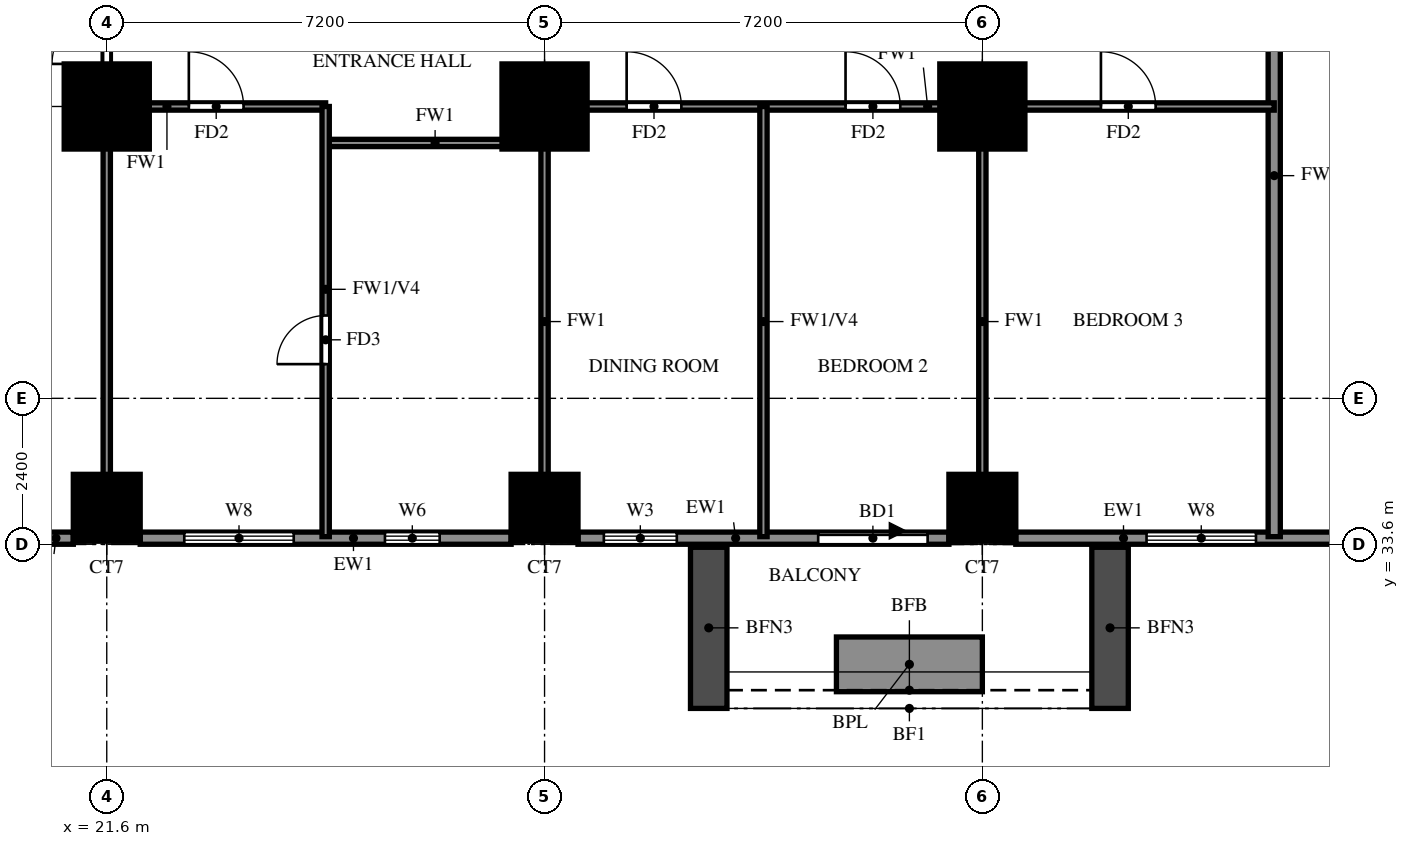
"""IFC4 building model, lengths in metres.
Left out: names, types, materials, properties, quantities, classifications, styles, units other than length and angle.
Written with IfcOpenShell. Run it as: python <this file> out.ifc"""

import sys

from ifc_helpers import new_model, si_unit, direction, frame, frame_2d, origin, origin_2d, place, context, subcontext, project, spatial, rectangle, extrude, source, transform, mapped, element, fill, save


model = new_model("IFC4")
c1 = context("Model", 3, precision=1e-05, world=origin(), true_north=direction((0.0, 1.0)))
c2 = subcontext(c1, "Body", "Model", "MODEL_VIEW")
j1 = project(units=[si_unit("LENGTHUNIT", "METRE"), si_unit("PLANEANGLEUNIT", "RADIAN")], contexts=[c1])
p1 = place(None, origin())
s1 = spatial("IfcSite", under=j1, at=p1, CompositionType="ELEMENT")
p2 = place(p1, origin())
s2 = spatial("IfcBuilding", under=s1, at=p2, CompositionType="ELEMENT")
p3 = place(p2, frame((0.0, 0.0, 58.5)))
s3 = spatial("IfcBuildingStorey", under=s2, at=p3, CompositionType="ELEMENT", Elevation=58.5)
m1 = source(origin(), c2, "Body", "SweptSolid", [
    extrude(rectangle(XDim=1.1, YDim=1.1, at=origin_2d()), origin(), (0.0, 0.0, 1.0), 3.18),
])
for number, where, z_axis, x_axis in (
    (1, (21.6, 34.2, 0.0), (0.0, 0.0, 1.0), (1.0, 0.0, 0.0)),
    (2, (28.8, 34.2, 0.0), (0.0, 0.0, 1.0), (1.0, 0.0, 0.0)),
    (3, (36.0, 34.2, 0.0), (0.0, 0.0, 1.0), (1.0, 0.0, 0.0)),
):
    element("IfcColumn", number, at=place(p3, frame(where, z_axis=z_axis, x_axis=x_axis)), inside=s3, PredefinedType="COLUMN", context=c2, shape_type="MappedRepresentation", body=[
        mapped(m1, transform((0.0, 0.0, 0.0))),
    ])
m2 = source(origin(), c2, "Body", "SweptSolid", [
    extrude(rectangle(XDim=1.4, YDim=1.4, at=origin_2d()), origin(), (0.0, 0.0, 1.0), 3.18),
])
for number, where, z_axis, x_axis in (
    (4, (21.6, 40.8, 0.0), (0.0, 0.0, 1.0), (1.0, 0.0, 0.0)),
    (5, (28.8, 40.8, 0.0), (0.0, 0.0, 1.0), (1.0, 0.0, 0.0)),
    (6, (36.0, 40.8, 0.0), (0.0, 0.0, 1.0), (1.0, 0.0, 0.0)),
):
    element("IfcColumn", number, at=place(p3, frame(where, z_axis=z_axis, x_axis=x_axis)), inside=s3, PredefinedType="COLUMN", context=c2, shape_type="MappedRepresentation", body=[
        mapped(m2, transform((0.0, 0.0, 0.0))),
    ])
p4 = place(p3, frame((18.2, 33.7, 0.0), z_axis=(0.0, 0.0, 1.0), x_axis=(1.0, 0.0, 0.0)))
e7 = element("IfcWall", 7, at=p4, inside=s3, PredefinedType="SOLIDWALL", context=c2, shape_type="SweptSolid", body=[
    extrude(rectangle(XDim=2.85, YDim=0.2, at=frame_2d((1.425, 0.0))), origin(), (0.0, 0.0, 1.0), 3.18),
])
p5 = place(p4, frame((0.525, 0.0, 0.6)))
e8 = element("IfcOpeningElement", 8, at=p5, cuts=e7, PredefinedType="OPENING", context=c2, shape_type="SweptSolid", body=[
    extrude(rectangle(XDim=1.8, YDim=2.4, at=frame_2d((0.9, 1.2))), frame((0.0, 0.11, 0.0), z_axis=(0.0, -1.0, 0.0), x_axis=(1.0, 0.0, 0.0)), (0.0, 0.0, 1.0), 0.22),
])
p6 = place(p3, frame((22.15, 33.7, 0.0), z_axis=(0.0, 0.0, 1.0), x_axis=(1.0, 0.0, 0.0)))
e9 = element("IfcWall", 9, at=p6, inside=s3, PredefinedType="SOLIDWALL", context=c2, shape_type="SweptSolid", body=[
    extrude(rectangle(XDim=6.1, YDim=0.2, at=frame_2d((3.05, 0.0))), origin(), (0.0, 0.0, 1.0), 3.18),
])
p7 = place(p6, frame((0.725, 0.0, 0.6)))
e10 = element("IfcOpeningElement", 10, at=p7, cuts=e9, PredefinedType="OPENING", context=c2, shape_type="SweptSolid", body=[
    extrude(rectangle(XDim=1.8, YDim=2.4, at=frame_2d((0.9, 1.2))), frame((0.0, 0.11, 0.0), z_axis=(0.0, -1.0, 0.0), x_axis=(1.0, 0.0, 0.0)), (0.0, 0.0, 1.0), 0.22),
])
p8 = place(p6, frame((4.025, 0.0, 1.5)))
e11 = element("IfcOpeningElement", 11, at=p8, cuts=e9, PredefinedType="OPENING", context=c2, shape_type="SweptSolid", body=[
    extrude(rectangle(XDim=0.9, YDim=0.9, at=frame_2d((0.45, 0.45))), frame((0.0, 0.11, 0.0), z_axis=(0.0, -1.0, 0.0), x_axis=(1.0, 0.0, 0.0)), (0.0, 0.0, 1.0), 0.22),
])
p9 = place(p3, frame((29.35, 33.7, 0.0), z_axis=(0.0, 0.0, 1.0), x_axis=(1.0, 0.0, 0.0)))
e12 = element("IfcWall", 12, at=p9, inside=s3, PredefinedType="SOLIDWALL", context=c2, shape_type="SweptSolid", body=[
    extrude(rectangle(XDim=6.1, YDim=0.2, at=frame_2d((3.05, 0.0))), origin(), (0.0, 0.0, 1.0), 3.18),
])
p10 = place(p9, frame((3.95, 0.0, 0.0)))
e13 = element("IfcOpeningElement", 13, at=p10, cuts=e12, PredefinedType="OPENING", context=c2, shape_type="SweptSolid", body=[
    extrude(rectangle(XDim=1.8, YDim=2.4, at=frame_2d((0.9, 1.2))), frame((0.0, 0.11, 0.0), z_axis=(0.0, -1.0, 0.0), x_axis=(1.0, 0.0, 0.0)), (0.0, 0.0, 1.0), 0.22),
])
p11 = place(p9, frame((0.425, 0.0, 0.6)))
e14 = element("IfcOpeningElement", 14, at=p11, cuts=e12, PredefinedType="OPENING", context=c2, shape_type="SweptSolid", body=[
    extrude(rectangle(XDim=1.2, YDim=2.4, at=frame_2d((0.6, 1.2))), frame((0.0, 0.11, 0.0), z_axis=(0.0, -1.0, 0.0), x_axis=(1.0, 0.0, 0.0)), (0.0, 0.0, 1.0), 0.22),
])
p12 = place(p3, frame((36.55, 33.7, 0.0), z_axis=(0.0, 0.0, 1.0), x_axis=(1.0, 0.0, 0.0)))
e15 = element("IfcWall", 15, at=p12, inside=s3, PredefinedType="SOLIDWALL", context=c2, shape_type="SweptSolid", body=[
    extrude(rectangle(XDim=5.45, YDim=0.2, at=frame_2d((2.725, 0.0))), origin(), (0.0, 0.0, 1.0), 3.18),
])
p13 = place(p12, frame((2.15, 0.0, 0.6)))
e16 = element("IfcOpeningElement", 16, at=p13, cuts=e15, PredefinedType="OPENING", context=c2, shape_type="SweptSolid", body=[
    extrude(rectangle(XDim=1.8, YDim=2.4, at=frame_2d((0.9, 1.2))), frame((0.0, 0.11, 0.0), z_axis=(0.0, -1.0, 0.0), x_axis=(1.0, 0.0, 0.0)), (0.0, 0.0, 1.0), 0.22),
])
for number, where, z_axis, x_axis in (
    (17, (31.5, 33.55, 0.0), (0.0, 0.0, 1.0), (0.0, -1.0, 0.0)),
    (18, (38.1, 33.55, 0.0), (0.0, 0.0, 1.0), (0.0, -1.0, 0.0)),
):
    element("IfcWall", number, at=place(p3, frame(where, z_axis=z_axis, x_axis=x_axis)), inside=s3, PredefinedType="SOLIDWALL", context=c2, shape_type="SweptSolid", body=[
        extrude(rectangle(XDim=2.65, YDim=0.6, at=frame_2d((1.325, 0.0))), origin(), (0.0, 0.0, 1.0), 2.85),
    ])
p14 = place(p3, frame((33.6, 31.625, 0.0), z_axis=(0.0, 0.0, 1.0), x_axis=(1.0, 0.0, 0.0)))
e19 = element("IfcWall", 19, at=p14, inside=s3, PredefinedType="SOLIDWALL", context=c2, shape_type="SweptSolid", body=[
    extrude(rectangle(XDim=2.4, YDim=0.9, at=frame_2d((1.2, 0.0))), origin(), (0.0, 0.0, 1.0), 0.9),
])
p15 = place(p3, frame((40.8, 33.725, 0.0), z_axis=(0.0, 0.0, 1.0), x_axis=(0.0, 1.0, 0.0)))
e20 = element("IfcWall", 20, at=p15, inside=s3, PredefinedType="SOLIDWALL", context=c2, shape_type="SweptSolid", body=[
    extrude(rectangle(XDim=11.875, YDim=0.2, at=frame_2d((5.938, 0.0))), origin(), (0.0, 0.0, 1.0), 2.28),
])
p16 = place(p3, frame((25.2, 40.2, 0.0), z_axis=(0.0, 0.0, 1.0), x_axis=(1.0, 0.0, 0.0)))
e21 = element("IfcWall", 21, at=p16, inside=s3, PredefinedType="PARTITIONING", context=c2, shape_type="SweptSolid", body=[
    extrude(rectangle(XDim=3.6, YDim=0.12, at=frame_2d((1.8, 0.0))), origin(), (0.0, 0.0, 1.0), 3.18),
])
p17 = place(p3, frame((21.6, 40.8, 0.0), z_axis=(0.0, 0.0, 1.0), x_axis=(1.0, 0.0, 0.0)))
e22 = element("IfcWall", 22, at=p17, inside=s3, PredefinedType="PARTITIONING", context=c2, shape_type="SweptSolid", body=[
    extrude(rectangle(XDim=3.6, YDim=0.12, at=frame_2d((1.8, 0.0))), origin(), (0.0, 0.0, 1.0), 3.18),
])
p18 = place(p17, frame((1.35, 0.0, 0.0)))
e23 = element("IfcOpeningElement", 23, at=p18, cuts=e22, PredefinedType="OPENING", context=c2, shape_type="SweptSolid", body=[
    extrude(rectangle(XDim=0.9, YDim=2.1, at=frame_2d((0.45, 1.05))), frame((0.0, 0.07, 0.0), z_axis=(0.0, -1.0, 0.0), x_axis=(1.0, 0.0, 0.0)), (0.0, 0.0, 1.0), 0.14),
])
p19 = place(p3, frame((28.8, 40.8, 0.0), z_axis=(0.0, 0.0, 1.0), x_axis=(1.0, 0.0, 0.0)))
e24 = element("IfcWall", 24, at=p19, inside=s3, PredefinedType="PARTITIONING", context=c2, shape_type="SweptSolid", body=[
    extrude(rectangle(XDim=12.0, YDim=0.12, at=frame_2d((6.0, 0.0))), origin(), (0.0, 0.0, 1.0), 3.18),
])
p20 = place(p19, frame((1.35, 0.0, 0.0)))
e25 = element("IfcOpeningElement", 25, at=p20, cuts=e24, PredefinedType="OPENING", context=c2, shape_type="SweptSolid", body=[
    extrude(rectangle(XDim=0.9, YDim=2.1, at=frame_2d((0.45, 1.05))), frame((0.0, 0.07, 0.0), z_axis=(0.0, -1.0, 0.0), x_axis=(1.0, 0.0, 0.0)), (0.0, 0.0, 1.0), 0.14),
])
p21 = place(p19, frame((4.95, 0.0, 0.0)))
e26 = element("IfcOpeningElement", 26, at=p21, cuts=e24, PredefinedType="OPENING", context=c2, shape_type="SweptSolid", body=[
    extrude(rectangle(XDim=0.9, YDim=2.1, at=frame_2d((0.45, 1.05))), frame((0.0, 0.07, 0.0), z_axis=(0.0, -1.0, 0.0), x_axis=(1.0, 0.0, 0.0)), (0.0, 0.0, 1.0), 0.14),
])
p22 = place(p19, frame((9.15, 0.0, 0.0)))
e27 = element("IfcOpeningElement", 27, at=p22, cuts=e24, PredefinedType="OPENING", context=c2, shape_type="SweptSolid", body=[
    extrude(rectangle(XDim=0.9, YDim=2.1, at=frame_2d((0.45, 1.05))), frame((0.0, 0.07, 0.0), z_axis=(0.0, -1.0, 0.0), x_axis=(1.0, 0.0, 0.0)), (0.0, 0.0, 1.0), 0.14),
])
p23 = place(p3, frame((21.6, 33.725, 0.0), z_axis=(0.0, 0.0, 1.0), x_axis=(0.0, 1.0, 0.0)))
e28 = element("IfcWall", 28, at=p23, inside=s3, PredefinedType="PARTITIONING", context=c2, shape_type="SweptSolid", body=[
    extrude(rectangle(XDim=17.875, YDim=0.12, at=frame_2d((8.938, 0.0))), origin(), (0.0, 0.0, 1.0), 3.18),
])
p24 = place(p23, frame((7.775, 0.0, 0.0)))
e29 = element("IfcOpeningElement", 29, at=p24, cuts=e28, PredefinedType="OPENING", context=c2, shape_type="SweptSolid", body=[
    extrude(rectangle(XDim=0.9, YDim=2.1, at=frame_2d((0.45, 1.05))), frame((0.0, 0.07, 0.0), z_axis=(0.0, -1.0, 0.0), x_axis=(1.0, 0.0, 0.0)), (0.0, 0.0, 1.0), 0.14),
])
p25 = place(p23, frame((15.625, 0.0, 0.0)))
e30 = element("IfcOpeningElement", 30, at=p25, cuts=e28, PredefinedType="OPENING", context=c2, shape_type="SweptSolid", body=[
    extrude(rectangle(XDim=0.9, YDim=2.1, at=frame_2d((0.45, 1.05))), frame((0.0, 0.07, 0.0), z_axis=(0.0, -1.0, 0.0), x_axis=(1.0, 0.0, 0.0)), (0.0, 0.0, 1.0), 0.14),
])
p26 = place(p3, frame((25.2, 33.725, 0.0), z_axis=(0.0, 0.0, 1.0), x_axis=(0.0, 1.0, 0.0)))
e31 = element("IfcWall", 31, at=p26, inside=s3, PredefinedType="PARTITIONING", context=c2, shape_type="SweptSolid", body=[
    extrude(rectangle(XDim=7.075, YDim=0.12, at=frame_2d((3.538, 0.0))), origin(), (0.0, 0.0, 1.0), 2.28),
])
p27 = place(p26, frame((2.837, 0.0, 0.0)))
e32 = element("IfcOpeningElement", 32, at=p27, cuts=e31, PredefinedType="OPENING", context=c2, shape_type="SweptSolid", body=[
    extrude(rectangle(XDim=0.8, YDim=2.1, at=frame_2d((0.4, 1.05))), frame((0.0, 0.07, 0.0), z_axis=(0.0, -1.0, 0.0), x_axis=(1.0, 0.0, 0.0)), (0.0, 0.0, 1.0), 0.14),
])
p28 = place(p3, frame((28.8, 33.725, 0.0), z_axis=(0.0, 0.0, 1.0), x_axis=(0.0, 1.0, 0.0)))
e33 = element("IfcWall", 33, at=p28, inside=s3, PredefinedType="PARTITIONING", context=c2, shape_type="SweptSolid", body=[
    extrude(rectangle(XDim=7.075, YDim=0.12, at=frame_2d((3.538, 0.0))), origin(), (0.0, 0.0, 1.0), 3.18),
])
p29 = place(p3, frame((32.4, 33.725, 0.0), z_axis=(0.0, 0.0, 1.0), x_axis=(0.0, 1.0, 0.0)))
e34 = element("IfcWall", 34, at=p29, inside=s3, PredefinedType="PARTITIONING", context=c2, shape_type="SweptSolid", body=[
    extrude(rectangle(XDim=7.075, YDim=0.12, at=frame_2d((3.538, 0.0))), origin(), (0.0, 0.0, 1.0), 2.28),
])
p30 = place(p3, frame((36.0, 33.725, 0.0), z_axis=(0.0, 0.0, 1.0), x_axis=(0.0, 1.0, 0.0)))
e35 = element("IfcWall", 35, at=p30, inside=s3, PredefinedType="PARTITIONING", context=c2, shape_type="SweptSolid", body=[
    extrude(rectangle(XDim=7.075, YDim=0.12, at=frame_2d((3.538, 0.0))), origin(), (0.0, 0.0, 1.0), 3.18),
])
p31 = place(p7, origin())
e36 = element("IfcWindow", 36, at=p31, inside=s3, PartitioningType="DOUBLE_PANEL_VERTICAL", PredefinedType="WINDOW", context=c2, shape_type="SweptSolid", body=[
    extrude(rectangle(XDim=1.8, YDim=2.4, at=frame_2d((0.9, 1.2))), frame((0.0, 0.03, 0.0), z_axis=(0.0, -1.0, 0.0), x_axis=(1.0, 0.0, 0.0)), (0.0, 0.0, 1.0), 0.06),
])
fill(e10, e36)
p32 = place(p8, origin())
e37 = element("IfcWindow", 37, at=p32, inside=s3, PartitioningType="SINGLE_PANEL", PredefinedType="WINDOW", context=c2, shape_type="SweptSolid", body=[
    extrude(rectangle(XDim=0.9, YDim=0.9, at=frame_2d((0.45, 0.45))), frame((0.0, 0.03, 0.0), z_axis=(0.0, -1.0, 0.0), x_axis=(1.0, 0.0, 0.0)), (0.0, 0.0, 1.0), 0.06),
])
fill(e11, e37)
p33 = place(p10, origin())
e38 = element("IfcDoor", 38, at=p33, inside=s3, OperationType="DOUBLE_DOOR_SLIDING", PredefinedType="DOOR", context=c2, shape_type="SweptSolid", body=[
    extrude(rectangle(XDim=1.8, YDim=2.4, at=frame_2d((0.9, 1.2))), frame((0.0, 0.025, 0.0), z_axis=(0.0, -1.0, 0.0), x_axis=(1.0, 0.0, 0.0)), (0.0, 0.0, 1.0), 0.05),
])
fill(e13, e38)
p34 = place(p11, origin())
e39 = element("IfcWindow", 39, at=p34, inside=s3, PartitioningType="SINGLE_PANEL", PredefinedType="WINDOW", context=c2, shape_type="SweptSolid", body=[
    extrude(rectangle(XDim=1.2, YDim=2.4, at=frame_2d((0.6, 1.2))), frame((0.0, 0.03, 0.0), z_axis=(0.0, -1.0, 0.0), x_axis=(1.0, 0.0, 0.0)), (0.0, 0.0, 1.0), 0.06),
])
fill(e14, e39)
p35 = place(p13, origin())
e40 = element("IfcWindow", 40, at=p35, inside=s3, PartitioningType="DOUBLE_PANEL_VERTICAL", PredefinedType="WINDOW", context=c2, shape_type="SweptSolid", body=[
    extrude(rectangle(XDim=1.8, YDim=2.4, at=frame_2d((0.9, 1.2))), frame((0.0, 0.03, 0.0), z_axis=(0.0, -1.0, 0.0), x_axis=(1.0, 0.0, 0.0)), (0.0, 0.0, 1.0), 0.06),
])
fill(e16, e40)
p36 = place(p24, origin())
e41 = element("IfcDoor", 41, at=p36, inside=s3, OperationType="SINGLE_SWING_LEFT", PredefinedType="DOOR", context=c2, shape_type="SweptSolid", body=[
    extrude(rectangle(XDim=0.9, YDim=2.1, at=frame_2d((0.45, 1.05))), frame((0.0, 0.025, 0.0), z_axis=(0.0, -1.0, 0.0), x_axis=(1.0, 0.0, 0.0)), (0.0, 0.0, 1.0), 0.05),
])
fill(e29, e41)
p37 = place(p18, origin())
e42 = element("IfcDoor", 42, at=p37, inside=s3, OperationType="SINGLE_SWING_LEFT", PredefinedType="DOOR", context=c2, shape_type="SweptSolid", body=[
    extrude(rectangle(XDim=0.9, YDim=2.1, at=frame_2d((0.45, 1.05))), frame((0.0, 0.025, 0.0), z_axis=(0.0, -1.0, 0.0), x_axis=(1.0, 0.0, 0.0)), (0.0, 0.0, 1.0), 0.05),
])
fill(e23, e42)
p38 = place(p27, origin())
e43 = element("IfcDoor", 43, at=p38, inside=s3, OperationType="SINGLE_SWING_LEFT", PredefinedType="DOOR", context=c2, shape_type="SweptSolid", body=[
    extrude(rectangle(XDim=0.8, YDim=2.1, at=frame_2d((0.4, 1.05))), frame((0.0, 0.025, 0.0), z_axis=(0.0, -1.0, 0.0), x_axis=(1.0, 0.0, 0.0)), (0.0, 0.0, 1.0), 0.05),
])
fill(e32, e43)
p39 = place(p20, origin())
e44 = element("IfcDoor", 44, at=p39, inside=s3, OperationType="SINGLE_SWING_RIGHT", PredefinedType="DOOR", context=c2, shape_type="SweptSolid", body=[
    extrude(rectangle(XDim=0.9, YDim=2.1, at=frame_2d((0.45, 1.05))), frame((0.0, 0.025, 0.0), z_axis=(0.0, -1.0, 0.0), x_axis=(1.0, 0.0, 0.0)), (0.0, 0.0, 1.0), 0.05),
])
fill(e25, e44)
p40 = place(p21, origin())
e45 = element("IfcDoor", 45, at=p40, inside=s3, OperationType="SINGLE_SWING_LEFT", PredefinedType="DOOR", context=c2, shape_type="SweptSolid", body=[
    extrude(rectangle(XDim=0.9, YDim=2.1, at=frame_2d((0.45, 1.05))), frame((0.0, 0.025, 0.0), z_axis=(0.0, -1.0, 0.0), x_axis=(1.0, 0.0, 0.0)), (0.0, 0.0, 1.0), 0.05),
])
fill(e26, e45)
p41 = place(p22, origin())
e46 = element("IfcDoor", 46, at=p41, inside=s3, OperationType="SINGLE_SWING_LEFT", PredefinedType="DOOR", context=c2, shape_type="SweptSolid", body=[
    extrude(rectangle(XDim=0.9, YDim=2.1, at=frame_2d((0.45, 1.05))), frame((0.0, 0.025, 0.0), z_axis=(0.0, -1.0, 0.0), x_axis=(1.0, 0.0, 0.0)), (0.0, 0.0, 1.0), 0.05),
])
fill(e27, e46)
save(model, sys.argv[1])
